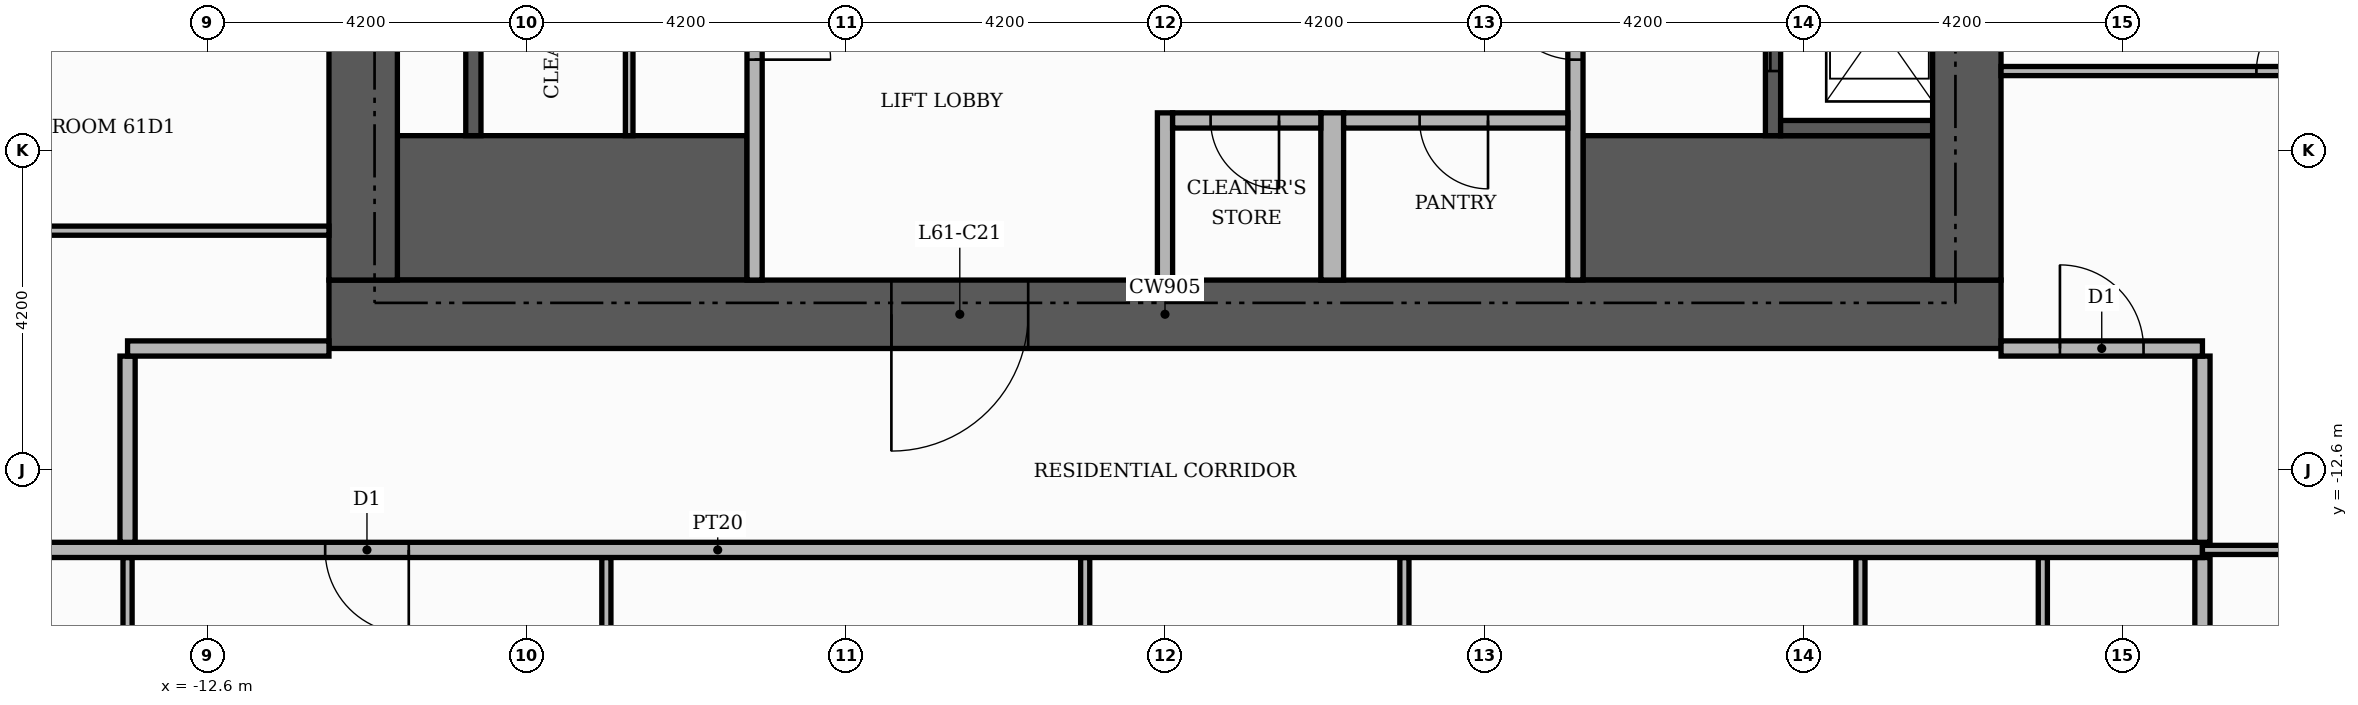
"""IFC4 building model, lengths in metres.
Left out: names, types, materials, properties, quantities, classifications, styles, units other than length and angle.
Written with IfcOpenShell. Run it as: python <this file> out.ifc"""

import sys

from ifc_helpers import new_model, si_unit, direction, frame, frame_2d, origin, place, context, subcontext, project, spatial, rectangle, extrude, element, fill, save


model = new_model("IFC4")
c1 = context("Model", 3, precision=1e-05, world=origin(), true_north=direction((0.0, 1.0)))
c2 = subcontext(c1, "Body", "Model", "MODEL_VIEW")
j1 = project(units=[si_unit("LENGTHUNIT", "METRE"), si_unit("PLANEANGLEUNIT", "RADIAN")], contexts=[c1])
p1 = place(None, origin())
s1 = spatial("IfcSite", under=j1, at=p1, CompositionType="ELEMENT")
p2 = place(p1, origin())
s2 = spatial("IfcBuilding", under=s1, at=p2, CompositionType="ELEMENT")
p3 = place(p2, frame((0.0, 0.0, 256.2)))
s3 = spatial("IfcBuildingStorey", under=s2, at=p3, CompositionType="ELEMENT", Elevation=256.2)
for number, where, z_axis, x_axis in (
    (1, (-10.1, -9.15, 0.0), (0.0, 0.0, 1.0), (1.0, 0.0, 0.0)),
    (2, (5.5, -9.15, 0.0), (0.0, 0.0, 1.0), (1.0, 0.0, 0.0)),
):
    element("IfcWall", number, at=place(p3, frame(where, z_axis=z_axis, x_axis=x_axis)), inside=s3, PredefinedType="SHEAR", context=c2, shape_type="SweptSolid", body=[
        extrude(rectangle(XDim=4.6, YDim=1.9, at=frame_2d((2.3, 0.0))), origin(), (0.0, 0.0, 1.0), 3.48),
    ])
p4 = place(p3, frame((-9.1, -8.2, 0.0), z_axis=(0.0, 0.0, 1.0), x_axis=(0.0, 1.0, 0.0)))
e3 = element("IfcWall", 3, at=p4, inside=s3, PredefinedType="SHEAR", context=c2, shape_type="SweptSolid", body=[
    extrude(rectangle(XDim=16.4, YDim=0.2, at=frame_2d((8.2, 0.0))), origin(), (0.0, 0.0, 1.0), 3.48),
])
p5 = place(p3, frame((8.0, -8.2, 0.0), z_axis=(0.0, 0.0, 1.0), x_axis=(0.0, 1.0, 0.0)))
e4 = element("IfcWall", 4, at=p5, inside=s3, PredefinedType="SHEAR", context=c2, shape_type="SweptSolid", body=[
    extrude(rectangle(XDim=16.4, YDim=0.2, at=frame_2d((8.2, 0.0))), origin(), (0.0, 0.0, 1.0), 3.48),
])
p6 = place(p5, frame((0.85, 0.0, 0.0)))
e5 = element("IfcOpeningElement", 5, at=p6, cuts=e4, PredefinedType="OPENING", context=c2, shape_type="SweptSolid", body=[
    extrude(rectangle(XDim=1.2, YDim=2.1, at=frame_2d((0.6, 1.05))), frame((0.0, 0.11, 0.0), z_axis=(0.0, -1.0, 0.0), x_axis=(1.0, 0.0, 0.0)), (0.0, 0.0, 1.0), 0.22),
])
p7 = place(p5, frame((3.55, 0.0, 0.0)))
e6 = element("IfcOpeningElement", 6, at=p7, cuts=e4, PredefinedType="OPENING", context=c2, shape_type="SweptSolid", body=[
    extrude(rectangle(XDim=1.2, YDim=2.1, at=frame_2d((0.6, 1.05))), frame((0.0, 0.11, 0.0), z_axis=(0.0, -1.0, 0.0), x_axis=(1.0, 0.0, 0.0)), (0.0, 0.0, 1.0), 0.22),
])
p8 = place(p5, frame((6.25, 0.0, 0.0)))
e7 = element("IfcOpeningElement", 7, at=p8, cuts=e4, PredefinedType="OPENING", context=c2, shape_type="SweptSolid", body=[
    extrude(rectangle(XDim=1.2, YDim=2.1, at=frame_2d((0.6, 1.05))), frame((0.0, 0.11, 0.0), z_axis=(0.0, -1.0, 0.0), x_axis=(1.0, 0.0, 0.0)), (0.0, 0.0, 1.0), 0.22),
])
p9 = place(p5, frame((8.95, 0.0, 0.0)))
e8 = element("IfcOpeningElement", 8, at=p9, cuts=e4, PredefinedType="OPENING", context=c2, shape_type="SweptSolid", body=[
    extrude(rectangle(XDim=1.2, YDim=2.1, at=frame_2d((0.6, 1.05))), frame((0.0, 0.11, 0.0), z_axis=(0.0, -1.0, 0.0), x_axis=(1.0, 0.0, 0.0)), (0.0, 0.0, 1.0), 0.22),
])
p10 = place(p5, frame((11.65, 0.0, 0.0)))
e9 = element("IfcOpeningElement", 9, at=p10, cuts=e4, PredefinedType="OPENING", context=c2, shape_type="SweptSolid", body=[
    extrude(rectangle(XDim=1.2, YDim=2.1, at=frame_2d((0.6, 1.05))), frame((0.0, 0.11, 0.0), z_axis=(0.0, -1.0, 0.0), x_axis=(1.0, 0.0, 0.0)), (0.0, 0.0, 1.0), 0.22),
])
p11 = place(p5, frame((14.35, 0.0, 0.0)))
e10 = element("IfcOpeningElement", 10, at=p11, cuts=e4, PredefinedType="OPENING", context=c2, shape_type="SweptSolid", body=[
    extrude(rectangle(XDim=1.2, YDim=2.1, at=frame_2d((0.6, 1.05))), frame((0.0, 0.11, 0.0), z_axis=(0.0, -1.0, 0.0), x_axis=(1.0, 0.0, 0.0)), (0.0, 0.0, 1.0), 0.22),
])
p12 = place(p3, frame((8.1, -8.1, 0.0), z_axis=(0.0, 0.0, 1.0), x_axis=(1.0, 0.0, 0.0)))
e11 = element("IfcWall", 11, at=p12, inside=s3, PredefinedType="SHEAR", context=c2, shape_type="SweptSolid", body=[
    extrude(rectangle(XDim=2.0, YDim=0.2, at=frame_2d((1.0, 0.0))), origin(), (0.0, 0.0, 1.0), 3.48),
])
p13 = place(p3, frame((-11.0, -10.55, 0.0), z_axis=(0.0, 0.0, 1.0), x_axis=(1.0, 0.0, 0.0)))
e12 = element("IfcWall", 12, at=p13, inside=s3, PredefinedType="SHEAR", context=c2, shape_type="SweptSolid", body=[
    extrude(rectangle(XDim=22.0, YDim=0.9, at=frame_2d((11.0, 0.0))), origin(), (0.0, 0.0, 1.0), 3.48),
])
p14 = place(p13, frame((7.4, 0.0, 0.0)))
e13 = element("IfcOpeningElement", 13, at=p14, cuts=e12, PredefinedType="OPENING", context=c2, shape_type="SweptSolid", body=[
    extrude(rectangle(XDim=1.8, YDim=2.2, at=frame_2d((0.9, 1.1))), frame((0.0, 0.46, 0.0), z_axis=(0.0, -1.0, 0.0), x_axis=(1.0, 0.0, 0.0)), (0.0, 0.0, 1.0), 0.92),
])
for number, where, z_axis, x_axis in (
    (14, (-10.55, -10.1, 0.0), (0.0, 0.0, 1.0), (0.0, 1.0, 0.0)),
    (15, (10.55, -10.1, 0.0), (0.0, 0.0, 1.0), (0.0, 1.0, 0.0)),
):
    element("IfcWall", number, at=place(p3, frame(where, z_axis=z_axis, x_axis=x_axis)), inside=s3, PredefinedType="SHEAR", context=c2, shape_type="SweptSolid", body=[
        extrude(rectangle(XDim=20.2, YDim=0.9, at=frame_2d((10.1, 0.0))), origin(), (0.0, 0.0, 1.0), 3.48),
    ])
p15 = place(p3, frame((-5.4, -10.1, 0.0), z_axis=(0.0, 0.0, 1.0), x_axis=(0.0, 1.0, 0.0)))
e16 = element("IfcWall", 16, at=p15, inside=s3, PredefinedType="PARTITIONING", context=c2, shape_type="SweptSolid", body=[
    extrude(rectangle(XDim=4.6, YDim=0.2, at=frame_2d((2.3, 0.0))), origin(), (0.0, 0.0, 1.0), 3.48),
])
p16 = place(p15, frame((2.9, 0.0, 0.0)))
e17 = element("IfcOpeningElement", 17, at=p16, cuts=e16, PredefinedType="OPENING", context=c2, shape_type="SweptSolid", body=[
    extrude(rectangle(XDim=1.0, YDim=2.1, at=frame_2d((0.5, 1.05))), frame((0.0, 0.11, 0.0), z_axis=(0.0, -1.0, 0.0), x_axis=(1.0, 0.0, 0.0)), (0.0, 0.0, 1.0), 0.22),
])
p17 = place(p3, frame((0.0, -10.1, 0.0), z_axis=(0.0, 0.0, 1.0), x_axis=(0.0, 1.0, 0.0)))
e18 = element("IfcWall", 18, at=p17, inside=s3, PredefinedType="PARTITIONING", context=c2, shape_type="SweptSolid", body=[
    extrude(rectangle(XDim=2.2, YDim=0.2, at=frame_2d((1.1, 0.0))), origin(), (0.0, 0.0, 1.0), 3.48),
])
p18 = place(p3, frame((2.2, -10.1, 0.0), z_axis=(0.0, 0.0, 1.0), x_axis=(0.0, 1.0, 0.0)))
e19 = element("IfcWall", 19, at=p18, inside=s3, PredefinedType="PARTITIONING", context=c2, shape_type="SweptSolid", body=[
    extrude(rectangle(XDim=2.2, YDim=0.3, at=frame_2d((1.1, 0.0))), origin(), (0.0, 0.0, 1.0), 3.48),
])
p19 = place(p3, frame((5.4, -10.1, 0.0), z_axis=(0.0, 0.0, 1.0), x_axis=(0.0, 1.0, 0.0)))
e20 = element("IfcWall", 20, at=p19, inside=s3, PredefinedType="PARTITIONING", context=c2, shape_type="SweptSolid", body=[
    extrude(rectangle(XDim=4.6, YDim=0.2, at=frame_2d((2.3, 0.0))), origin(), (0.0, 0.0, 1.0), 3.48),
])
p20 = place(p19, frame((2.9, 0.0, 0.0)))
e21 = element("IfcOpeningElement", 21, at=p20, cuts=e20, PredefinedType="OPENING", context=c2, shape_type="SweptSolid", body=[
    extrude(rectangle(XDim=1.0, YDim=2.1, at=frame_2d((0.5, 1.05))), frame((0.0, 0.11, 0.0), z_axis=(0.0, -1.0, 0.0), x_axis=(1.0, 0.0, 0.0)), (0.0, 0.0, 1.0), 0.22),
])
p21 = place(p3, frame((-7.05, -8.2, 0.0), z_axis=(0.0, 0.0, 1.0), x_axis=(0.0, 1.0, 0.0)))
e22 = element("IfcWall", 22, at=p21, inside=s3, PredefinedType="PARTITIONING", context=c2, shape_type="SweptSolid", body=[
    extrude(rectangle(XDim=16.4, YDim=0.1, at=frame_2d((8.2, 0.0))), origin(), (0.0, 0.0, 1.0), 3.48),
])
p22 = place(p21, frame((1.35, 0.0, 0.0)))
e23 = element("IfcOpeningElement", 23, at=p22, cuts=e22, PredefinedType="OPENING", context=c2, shape_type="SweptSolid", body=[
    extrude(rectangle(XDim=0.9, YDim=2.1, at=frame_2d((0.45, 1.05))), frame((0.0, 0.06, 0.0), z_axis=(0.0, -1.0, 0.0), x_axis=(1.0, 0.0, 0.0)), (0.0, 0.0, 1.0), 0.12),
])
p23 = place(p21, frame((5.05, 0.0, 0.0)))
e24 = element("IfcOpeningElement", 24, at=p23, cuts=e22, PredefinedType="OPENING", context=c2, shape_type="SweptSolid", body=[
    extrude(rectangle(XDim=0.9, YDim=2.1, at=frame_2d((0.45, 1.05))), frame((0.0, 0.06, 0.0), z_axis=(0.0, -1.0, 0.0), x_axis=(1.0, 0.0, 0.0)), (0.0, 0.0, 1.0), 0.12),
])
p24 = place(p21, frame((8.95, 0.0, 0.0)))
e25 = element("IfcOpeningElement", 25, at=p24, cuts=e22, PredefinedType="OPENING", context=c2, shape_type="SweptSolid", body=[
    extrude(rectangle(XDim=0.9, YDim=2.1, at=frame_2d((0.45, 1.05))), frame((0.0, 0.06, 0.0), z_axis=(0.0, -1.0, 0.0), x_axis=(1.0, 0.0, 0.0)), (0.0, 0.0, 1.0), 0.12),
])
p25 = place(p21, frame((13.45, 0.0, 0.0)))
e26 = element("IfcOpeningElement", 26, at=p25, cuts=e22, PredefinedType="OPENING", context=c2, shape_type="SweptSolid", body=[
    extrude(rectangle(XDim=0.9, YDim=2.1, at=frame_2d((0.45, 1.05))), frame((0.0, 0.06, 0.0), z_axis=(0.0, -1.0, 0.0), x_axis=(1.0, 0.0, 0.0)), (0.0, 0.0, 1.0), 0.12),
])
p26 = place(p3, frame((0.1, -8.0, 0.0), z_axis=(0.0, 0.0, 1.0), x_axis=(1.0, 0.0, 0.0)))
e27 = element("IfcWall", 27, at=p26, inside=s3, PredefinedType="PARTITIONING", context=c2, shape_type="SweptSolid", body=[
    extrude(rectangle(XDim=1.95, YDim=0.2, at=frame_2d((0.975, 0.0))), origin(), (0.0, 0.0, 1.0), 3.48),
])
p27 = place(p26, frame((0.5, 0.0, 0.0)))
e28 = element("IfcOpeningElement", 28, at=p27, cuts=e27, PredefinedType="OPENING", context=c2, shape_type="SweptSolid", body=[
    extrude(rectangle(XDim=0.9, YDim=2.1, at=frame_2d((0.45, 1.05))), frame((0.0, 0.11, 0.0), z_axis=(0.0, -1.0, 0.0), x_axis=(1.0, 0.0, 0.0)), (0.0, 0.0, 1.0), 0.22),
])
p28 = place(p3, frame((2.35, -8.0, 0.0), z_axis=(0.0, 0.0, 1.0), x_axis=(1.0, 0.0, 0.0)))
e29 = element("IfcWall", 29, at=p28, inside=s3, PredefinedType="PARTITIONING", context=c2, shape_type="SweptSolid", body=[
    extrude(rectangle(XDim=2.95, YDim=0.2, at=frame_2d((1.475, 0.0))), origin(), (0.0, 0.0, 1.0), 3.48),
])
p29 = place(p28, frame((1.0, 0.0, 0.0)))
e30 = element("IfcOpeningElement", 30, at=p29, cuts=e29, PredefinedType="OPENING", context=c2, shape_type="SweptSolid", body=[
    extrude(rectangle(XDim=0.9, YDim=2.1, at=frame_2d((0.45, 1.05))), frame((0.0, 0.11, 0.0), z_axis=(0.0, -1.0, 0.0), x_axis=(1.0, 0.0, 0.0)), (0.0, 0.0, 1.0), 0.22),
])
p30 = place(p3, frame((13.65, -25.42, 0.0), z_axis=(0.0, 0.0, 1.0), x_axis=(0.0, 1.0, 0.0)))
e31 = element("IfcWall", 31, at=p30, inside=s3, PredefinedType="PARTITIONING", context=c2, shape_type="SweptSolid", body=[
    extrude(rectangle(XDim=11.67, YDim=0.2, at=frame_2d((5.835, 0.0))), origin(), (0.0, 0.0, 1.0), 3.48),
])
p31 = place(p3, frame((-13.65, -20.66, 0.0), z_axis=(0.0, 0.0, 1.0), x_axis=(0.0, 1.0, 0.0)))
e32 = element("IfcWall", 32, at=p31, inside=s3, PredefinedType="PARTITIONING", context=c2, shape_type="SweptSolid", body=[
    extrude(rectangle(XDim=6.91, YDim=0.12, at=frame_2d((3.455, 0.0))), origin(), (0.0, 0.0, 1.0), 3.48),
])
p32 = place(p31, frame((3.025, 0.0, 0.0)))
e33 = element("IfcOpeningElement", 33, at=p32, cuts=e32, PredefinedType="OPENING", context=c2, shape_type="SweptSolid", body=[
    extrude(rectangle(XDim=0.9, YDim=2.1, at=frame_2d((0.45, 1.05))), frame((0.0, 0.07, 0.0), z_axis=(0.0, -1.0, 0.0), x_axis=(1.0, 0.0, 0.0)), (0.0, 0.0, 1.0), 0.14),
])
for number, where, z_axis, x_axis in (
    (34, (-7.35, -19.16, 0.0), (0.0, 0.0, 1.0), (0.0, 1.0, 0.0)),
    (35, (-1.05, -19.16, 0.0), (0.0, 0.0, 1.0), (0.0, 1.0, 0.0)),
    (36, (3.15, -19.16, 0.0), (0.0, 0.0, 1.0), (0.0, 1.0, 0.0)),
    (37, (9.15, -19.16, 0.0), (0.0, 0.0, 1.0), (0.0, 1.0, 0.0)),
    (38, (11.55, -19.16, 0.0), (0.0, 0.0, 1.0), (0.0, 1.0, 0.0)),
):
    element("IfcWall", number, at=place(p3, frame(where, z_axis=z_axis, x_axis=x_axis)), inside=s3, PredefinedType="PARTITIONING", context=c2, shape_type="SweptSolid", body=[
        extrude(rectangle(XDim=5.41, YDim=0.12, at=frame_2d((2.705, 0.0))), origin(), (0.0, 0.0, 1.0), 3.48),
    ])
p33 = place(p3, frame((-25.42, -13.65, 0.0), z_axis=(0.0, 0.0, 1.0), x_axis=(1.0, 0.0, 0.0)))
e39 = element("IfcWall", 39, at=p33, inside=s3, PredefinedType="PARTITIONING", context=c2, shape_type="SweptSolid", body=[
    extrude(rectangle(XDim=39.07, YDim=0.2, at=frame_2d((19.535, 0.0))), origin(), (0.0, 0.0, 1.0), 3.48),
])
p34 = place(p33, frame((14.37, 0.0, 0.0)))
e40 = element("IfcOpeningElement", 40, at=p34, cuts=e39, PredefinedType="OPENING", context=c2, shape_type="SweptSolid", body=[
    extrude(rectangle(XDim=1.1, YDim=2.4, at=frame_2d((0.55, 1.2))), frame((0.0, 0.11, 0.0), z_axis=(0.0, -1.0, 0.0), x_axis=(1.0, 0.0, 0.0)), (0.0, 0.0, 1.0), 0.22),
])
p35 = place(p3, frame((13.65, -13.65, 0.0), z_axis=(0.0, 0.0, 1.0), x_axis=(1.0, 0.0, 0.0)))
e41 = element("IfcWall", 41, at=p35, inside=s3, PredefinedType="PARTITIONING", context=c2, shape_type="SweptSolid", body=[
    extrude(rectangle(XDim=6.47, YDim=0.12, at=frame_2d((3.235, 0.0))), origin(), (0.0, 0.0, 1.0), 3.48),
])
p36 = place(p35, frame((2.785, 0.0, 0.0)))
e42 = element("IfcOpeningElement", 42, at=p36, cuts=e41, PredefinedType="OPENING", context=c2, shape_type="SweptSolid", body=[
    extrude(rectangle(XDim=0.9, YDim=2.1, at=frame_2d((0.45, 1.05))), frame((0.0, 0.07, 0.0), z_axis=(0.0, -1.0, 0.0), x_axis=(1.0, 0.0, 0.0)), (0.0, 0.0, 1.0), 0.14),
])
for number, where, z_axis, x_axis in (
    (43, (-13.65, -13.55, 0.0), (0.0, 0.0, 1.0), (0.0, 1.0, 0.0)),
    (44, (13.65, -13.55, 0.0), (0.0, 0.0, 1.0), (0.0, 1.0, 0.0)),
):
    element("IfcWall", number, at=place(p3, frame(where, z_axis=z_axis, x_axis=x_axis)), inside=s3, PredefinedType="PARTITIONING", context=c2, shape_type="SweptSolid", body=[
        extrude(rectangle(XDim=2.45, YDim=0.2, at=frame_2d((1.225, 0.0))), origin(), (0.0, 0.0, 1.0), 3.48),
    ])
p37 = place(p3, frame((-13.65, -11.0, 0.0), z_axis=(0.0, 0.0, 1.0), x_axis=(1.0, 0.0, 0.0)))
e45 = element("IfcWall", 45, at=p37, inside=s3, PredefinedType="PARTITIONING", context=c2, shape_type="SweptSolid", body=[
    extrude(rectangle(XDim=2.65, YDim=0.2, at=frame_2d((1.325, 0.0))), origin(), (0.0, 0.0, 1.0), 3.48),
])
p38 = place(p3, frame((11.0, -11.0, 0.0), z_axis=(0.0, 0.0, 1.0), x_axis=(1.0, 0.0, 0.0)))
e46 = element("IfcWall", 46, at=p38, inside=s3, PredefinedType="PARTITIONING", context=c2, shape_type="SweptSolid", body=[
    extrude(rectangle(XDim=2.65, YDim=0.2, at=frame_2d((1.325, 0.0))), origin(), (0.0, 0.0, 1.0), 3.48),
])
p39 = place(p38, frame((0.775, 0.0, 0.0)))
e47 = element("IfcOpeningElement", 47, at=p39, cuts=e46, PredefinedType="OPENING", context=c2, shape_type="SweptSolid", body=[
    extrude(rectangle(XDim=1.1, YDim=2.4, at=frame_2d((0.55, 1.2))), frame((0.0, 0.11, 0.0), z_axis=(0.0, -1.0, 0.0), x_axis=(1.0, 0.0, 0.0)), (0.0, 0.0, 1.0), 0.22),
])
p40 = place(p3, frame((-19.22, -9.45, 0.0), z_axis=(0.0, 0.0, 1.0), x_axis=(1.0, 0.0, 0.0)))
e48 = element("IfcWall", 48, at=p40, inside=s3, PredefinedType="PARTITIONING", context=c2, shape_type="SweptSolid", body=[
    extrude(rectangle(XDim=8.22, YDim=0.12, at=frame_2d((4.11, 0.0))), origin(), (0.0, 0.0, 1.0), 3.48),
])
p41 = place(p3, frame((11.0, -7.35, 0.0), z_axis=(0.0, 0.0, 1.0), x_axis=(1.0, 0.0, 0.0)))
e49 = element("IfcWall", 49, at=p41, inside=s3, PredefinedType="PARTITIONING", context=c2, shape_type="SweptSolid", body=[
    extrude(rectangle(XDim=7.62, YDim=0.12, at=frame_2d((3.81, 0.0))), origin(), (0.0, 0.0, 1.0), 3.48),
])
p42 = place(p41, frame((3.36, 0.0, 0.0)))
e50 = element("IfcOpeningElement", 50, at=p42, cuts=e49, PredefinedType="OPENING", context=c2, shape_type="SweptSolid", body=[
    extrude(rectangle(XDim=0.9, YDim=2.1, at=frame_2d((0.45, 1.05))), frame((0.0, 0.07, 0.0), z_axis=(0.0, -1.0, 0.0), x_axis=(1.0, 0.0, 0.0)), (0.0, 0.0, 1.0), 0.14),
])
p43 = place(p6, origin())
e51 = element("IfcDoor", 51, at=p43, inside=s3, OperationType="SLIDING_TO_LEFT", PredefinedType="DOOR", context=c2, shape_type="SweptSolid", body=[
    extrude(rectangle(XDim=1.2, YDim=2.1, at=frame_2d((0.6, 1.05))), frame((0.0, 0.025, 0.0), z_axis=(0.0, -1.0, 0.0), x_axis=(1.0, 0.0, 0.0)), (0.0, 0.0, 1.0), 0.05),
])
fill(e5, e51)
p44 = place(p16, frame((1.0, 0.0, 0.0), z_axis=(0.0, 0.0, 1.0), x_axis=(-1.0, 0.0, 0.0)))
e52 = element("IfcDoor", 52, at=p44, inside=s3, OperationType="SINGLE_SWING_LEFT", PredefinedType="DOOR", context=c2, shape_type="SweptSolid", body=[
    extrude(rectangle(XDim=1.0, YDim=2.1, at=frame_2d((0.5, 1.05))), frame((0.0, 0.025, 0.0), z_axis=(0.0, -1.0, 0.0), x_axis=(1.0, 0.0, 0.0)), (0.0, 0.0, 1.0), 0.05),
])
fill(e17, e52)
p45 = place(p20, origin())
e53 = element("IfcDoor", 53, at=p45, inside=s3, OperationType="SINGLE_SWING_RIGHT", PredefinedType="DOOR", context=c2, shape_type="SweptSolid", body=[
    extrude(rectangle(XDim=1.0, YDim=2.1, at=frame_2d((0.5, 1.05))), frame((0.0, 0.025, 0.0), z_axis=(0.0, -1.0, 0.0), x_axis=(1.0, 0.0, 0.0)), (0.0, 0.0, 1.0), 0.05),
])
fill(e21, e53)
p46 = place(p14, frame((1.8, 0.0, 0.0), z_axis=(0.0, 0.0, 1.0), x_axis=(-1.0, 0.0, 0.0)))
e54 = element("IfcDoor", 54, at=p46, inside=s3, OperationType="DOUBLE_DOOR_SINGLE_SWING", PredefinedType="DOOR", context=c2, shape_type="SweptSolid", body=[
    extrude(rectangle(XDim=1.8, YDim=2.2, at=frame_2d((0.9, 1.1))), frame((0.0, 0.025, 0.0), z_axis=(0.0, -1.0, 0.0), x_axis=(1.0, 0.0, 0.0)), (0.0, 0.0, 1.0), 0.05),
])
fill(e13, e54)
p47 = place(p27, frame((0.9, 0.0, 0.0), z_axis=(0.0, 0.0, 1.0), x_axis=(-1.0, 0.0, 0.0)))
e55 = element("IfcDoor", 55, at=p47, inside=s3, OperationType="SINGLE_SWING_RIGHT", PredefinedType="DOOR", context=c2, shape_type="SweptSolid", body=[
    extrude(rectangle(XDim=0.9, YDim=2.1, at=frame_2d((0.45, 1.05))), frame((0.0, 0.025, 0.0), z_axis=(0.0, -1.0, 0.0), x_axis=(1.0, 0.0, 0.0)), (0.0, 0.0, 1.0), 0.05),
])
fill(e28, e55)
p48 = place(p29, frame((0.9, 0.0, 0.0), z_axis=(0.0, 0.0, 1.0), x_axis=(-1.0, 0.0, 0.0)))
e56 = element("IfcDoor", 56, at=p48, inside=s3, OperationType="SINGLE_SWING_RIGHT", PredefinedType="DOOR", context=c2, shape_type="SweptSolid", body=[
    extrude(rectangle(XDim=0.9, YDim=2.1, at=frame_2d((0.45, 1.05))), frame((0.0, 0.025, 0.0), z_axis=(0.0, -1.0, 0.0), x_axis=(1.0, 0.0, 0.0)), (0.0, 0.0, 1.0), 0.05),
])
fill(e30, e56)
p49 = place(p34, frame((1.1, 0.0, 0.0), z_axis=(0.0, 0.0, 1.0), x_axis=(-1.0, 0.0, 0.0)))
e57 = element("IfcDoor", 57, at=p49, inside=s3, OperationType="SINGLE_SWING_RIGHT", PredefinedType="DOOR", context=c2, shape_type="SweptSolid", body=[
    extrude(rectangle(XDim=1.1, YDim=2.4, at=frame_2d((0.55, 1.2))), frame((0.0, 0.025, 0.0), z_axis=(0.0, -1.0, 0.0), x_axis=(1.0, 0.0, 0.0)), (0.0, 0.0, 1.0), 0.05),
])
fill(e40, e57)
p50 = place(p39, origin())
e58 = element("IfcDoor", 58, at=p50, inside=s3, OperationType="SINGLE_SWING_LEFT", PredefinedType="DOOR", context=c2, shape_type="SweptSolid", body=[
    extrude(rectangle(XDim=1.1, YDim=2.4, at=frame_2d((0.55, 1.2))), frame((0.0, 0.025, 0.0), z_axis=(0.0, -1.0, 0.0), x_axis=(1.0, 0.0, 0.0)), (0.0, 0.0, 1.0), 0.05),
])
fill(e47, e58)
p51 = place(p42, origin())
e59 = element("IfcDoor", 59, at=p51, inside=s3, OperationType="SINGLE_SWING_RIGHT", PredefinedType="DOOR", context=c2, shape_type="SweptSolid", body=[
    extrude(rectangle(XDim=0.9, YDim=2.1, at=frame_2d((0.45, 1.05))), frame((0.0, 0.025, 0.0), z_axis=(0.0, -1.0, 0.0), x_axis=(1.0, 0.0, 0.0)), (0.0, 0.0, 1.0), 0.05),
])
fill(e50, e59)
save(model, sys.argv[1])
